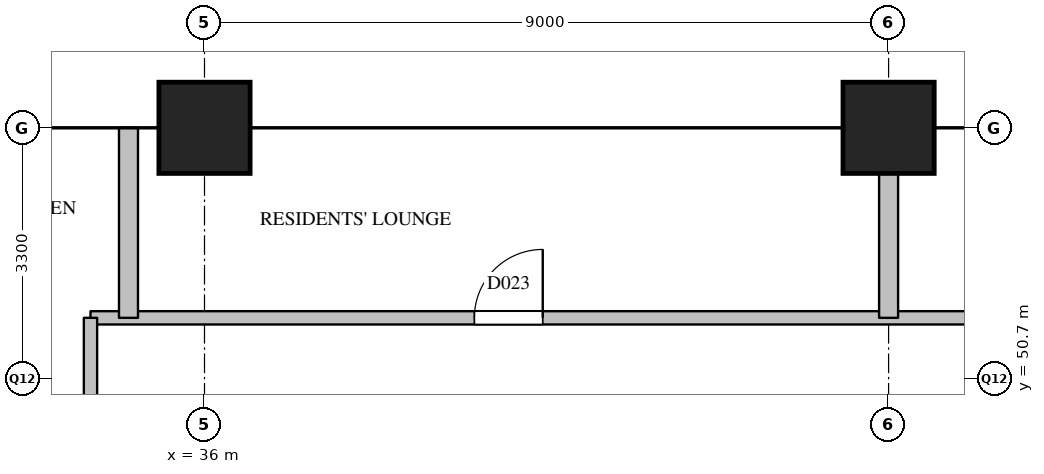
"""IFC4 building model, lengths in metres.
Left out: names, types, materials, properties, quantities, classifications, styles, units other than length and angle.
Written with IfcOpenShell. Run it as: python <this file> out.ifc"""

import sys

from ifc_helpers import new_model, si_unit, direction, frame, frame_2d, origin, origin_2d, place, context, subcontext, project, spatial, rectangle, extrude, element, fill, save


model = new_model("IFC4")
c1 = context("Model", 3, precision=1e-05, world=origin(), true_north=direction((0.0, 1.0)))
c2 = subcontext(c1, "Body", "Model", "MODEL_VIEW")
j1 = project(units=[si_unit("LENGTHUNIT", "METRE"), si_unit("PLANEANGLEUNIT", "RADIAN")], contexts=[c1])
p1 = place(None, origin())
s1 = spatial("IfcSite", under=j1, at=p1, CompositionType="ELEMENT")
p2 = place(p1, origin())
s2 = spatial("IfcBuilding", under=s1, at=p2, CompositionType="ELEMENT")
p3 = place(p2, frame((0.0, 0.0, 238.4)))
s3 = spatial("IfcBuildingStorey", under=s2, at=p3, CompositionType="ELEMENT", Elevation=238.4)
for number, where, z_axis, x_axis in (
    (1, (36.0, 54.0, 0.0), (0.0, 0.0, 1.0), (1.0, 0.0, 0.0)),
    (2, (45.0, 54.0, 0.0), (0.0, 0.0, 1.0), (1.0, 0.0, 0.0)),
):
    element("IfcColumn", number, at=place(p3, frame(where, z_axis=z_axis, x_axis=x_axis)), inside=s3, PredefinedType="COLUMN", context=c2, shape_type="SweptSolid", body=[
        extrude(rectangle(XDim=1.2, YDim=1.2, at=origin_2d()), origin(), (0.0, 0.0, 1.0), 3.9),
    ])
p4 = place(p3, frame((34.5, 51.5, 0.0), z_axis=(0.0, 0.0, 1.0), x_axis=(1.0, 0.0, 0.0)))
e3 = element("IfcWall", 3, at=p4, inside=s3, PredefinedType="PARTITIONING", context=c2, shape_type="SweptSolid", body=[
    extrude(rectangle(XDim=15.4, YDim=0.175, at=frame_2d((7.7, 0.0))), origin(), (0.0, 0.0, 1.0), 3.6),
])
p5 = place(p4, frame((12.45, 0.0, 0.0)))
e4 = element("IfcOpeningElement", 4, at=p5, cuts=e3, PredefinedType="OPENING", context=c2, shape_type="SweptSolid", body=[
    extrude(rectangle(XDim=1.0, YDim=2.1, at=frame_2d((0.5, 1.05))), frame((0.0, 0.097, 0.0), z_axis=(0.0, -1.0, 0.0), x_axis=(1.0, 0.0, 0.0)), (0.0, 0.0, 1.0), 0.195),
])
p6 = place(p4, frame((5.05, 0.0, 0.0)))
e5 = element("IfcOpeningElement", 5, at=p6, cuts=e3, PredefinedType="OPENING", context=c2, shape_type="SweptSolid", body=[
    extrude(rectangle(XDim=0.9, YDim=2.1, at=frame_2d((0.45, 1.05))), frame((0.0, 0.097, 0.0), z_axis=(0.0, -1.0, 0.0), x_axis=(1.0, 0.0, 0.0)), (0.0, 0.0, 1.0), 0.195),
])
p7 = place(p3, frame((34.5, 28.5, 0.0), z_axis=(0.0, 0.0, 1.0), x_axis=(0.0, 1.0, 0.0)))
e6 = element("IfcWall", 6, at=p7, inside=s3, PredefinedType="PARTITIONING", context=c2, shape_type="SweptSolid", body=[
    extrude(rectangle(XDim=23.0, YDim=0.175, at=frame_2d((11.5, 0.0))), origin(), (0.0, 0.0, 1.0), 3.6),
])
p8 = place(p7, frame((5.1, 0.0, 0.0)))
e7 = element("IfcOpeningElement", 7, at=p8, cuts=e6, PredefinedType="OPENING", context=c2, shape_type="SweptSolid", body=[
    extrude(rectangle(XDim=1.0, YDim=2.1, at=frame_2d((0.5, 1.05))), frame((0.0, 0.097, 0.0), z_axis=(0.0, -1.0, 0.0), x_axis=(1.0, 0.0, 0.0)), (0.0, 0.0, 1.0), 0.195),
])
p9 = place(p7, frame((6.9, 0.0, 0.0)))
e8 = element("IfcOpeningElement", 8, at=p9, cuts=e6, PredefinedType="OPENING", context=c2, shape_type="SweptSolid", body=[
    extrude(rectangle(XDim=1.0, YDim=2.1, at=frame_2d((0.5, 1.05))), frame((0.0, 0.097, 0.0), z_axis=(0.0, -1.0, 0.0), x_axis=(1.0, 0.0, 0.0)), (0.0, 0.0, 1.0), 0.195),
])
p10 = place(p7, frame((16.9, 0.0, 0.0)))
e9 = element("IfcOpeningElement", 9, at=p10, cuts=e6, PredefinedType="OPENING", context=c2, shape_type="SweptSolid", body=[
    extrude(rectangle(XDim=1.0, YDim=2.1, at=frame_2d((0.5, 1.05))), frame((0.0, 0.097, 0.0), z_axis=(0.0, -1.0, 0.0), x_axis=(1.0, 0.0, 0.0)), (0.0, 0.0, 1.0), 0.195),
])
p11 = place(p3, frame((35.0, 51.5, 0.0), z_axis=(0.0, 0.0, 1.0), x_axis=(0.0, 1.0, 0.0)))
e10 = element("IfcWall", 10, at=p11, inside=s3, PredefinedType="PARTITIONING", context=c2, shape_type="SweptSolid", body=[
    extrude(rectangle(XDim=2.5, YDim=0.25, at=frame_2d((1.25, 0.0))), origin(), (0.0, 0.0, 1.0), 2.6),
])
p12 = place(p3, frame((45.0, 51.5, 0.0), z_axis=(0.0, 0.0, 1.0), x_axis=(0.0, 1.0, 0.0)))
e11 = element("IfcWall", 11, at=p12, inside=s3, PredefinedType="PARTITIONING", context=c2, shape_type="SweptSolid", body=[
    extrude(rectangle(XDim=2.5, YDim=0.25, at=frame_2d((1.25, 0.0))), origin(), (0.0, 0.0, 1.0), 3.6),
])
p13 = place(p6, origin())
e12 = element("IfcDoor", 12, at=p13, inside=s3, OperationType="SINGLE_SWING_RIGHT", PredefinedType="DOOR", context=c2, shape_type="SweptSolid", body=[
    extrude(rectangle(XDim=0.9, YDim=2.1, at=frame_2d((0.45, 1.05))), frame((0.0, 0.025, 0.0), z_axis=(0.0, -1.0, 0.0), x_axis=(1.0, 0.0, 0.0)), (0.0, 0.0, 1.0), 0.05),
])
fill(e5, e12)
save(model, sys.argv[1])
